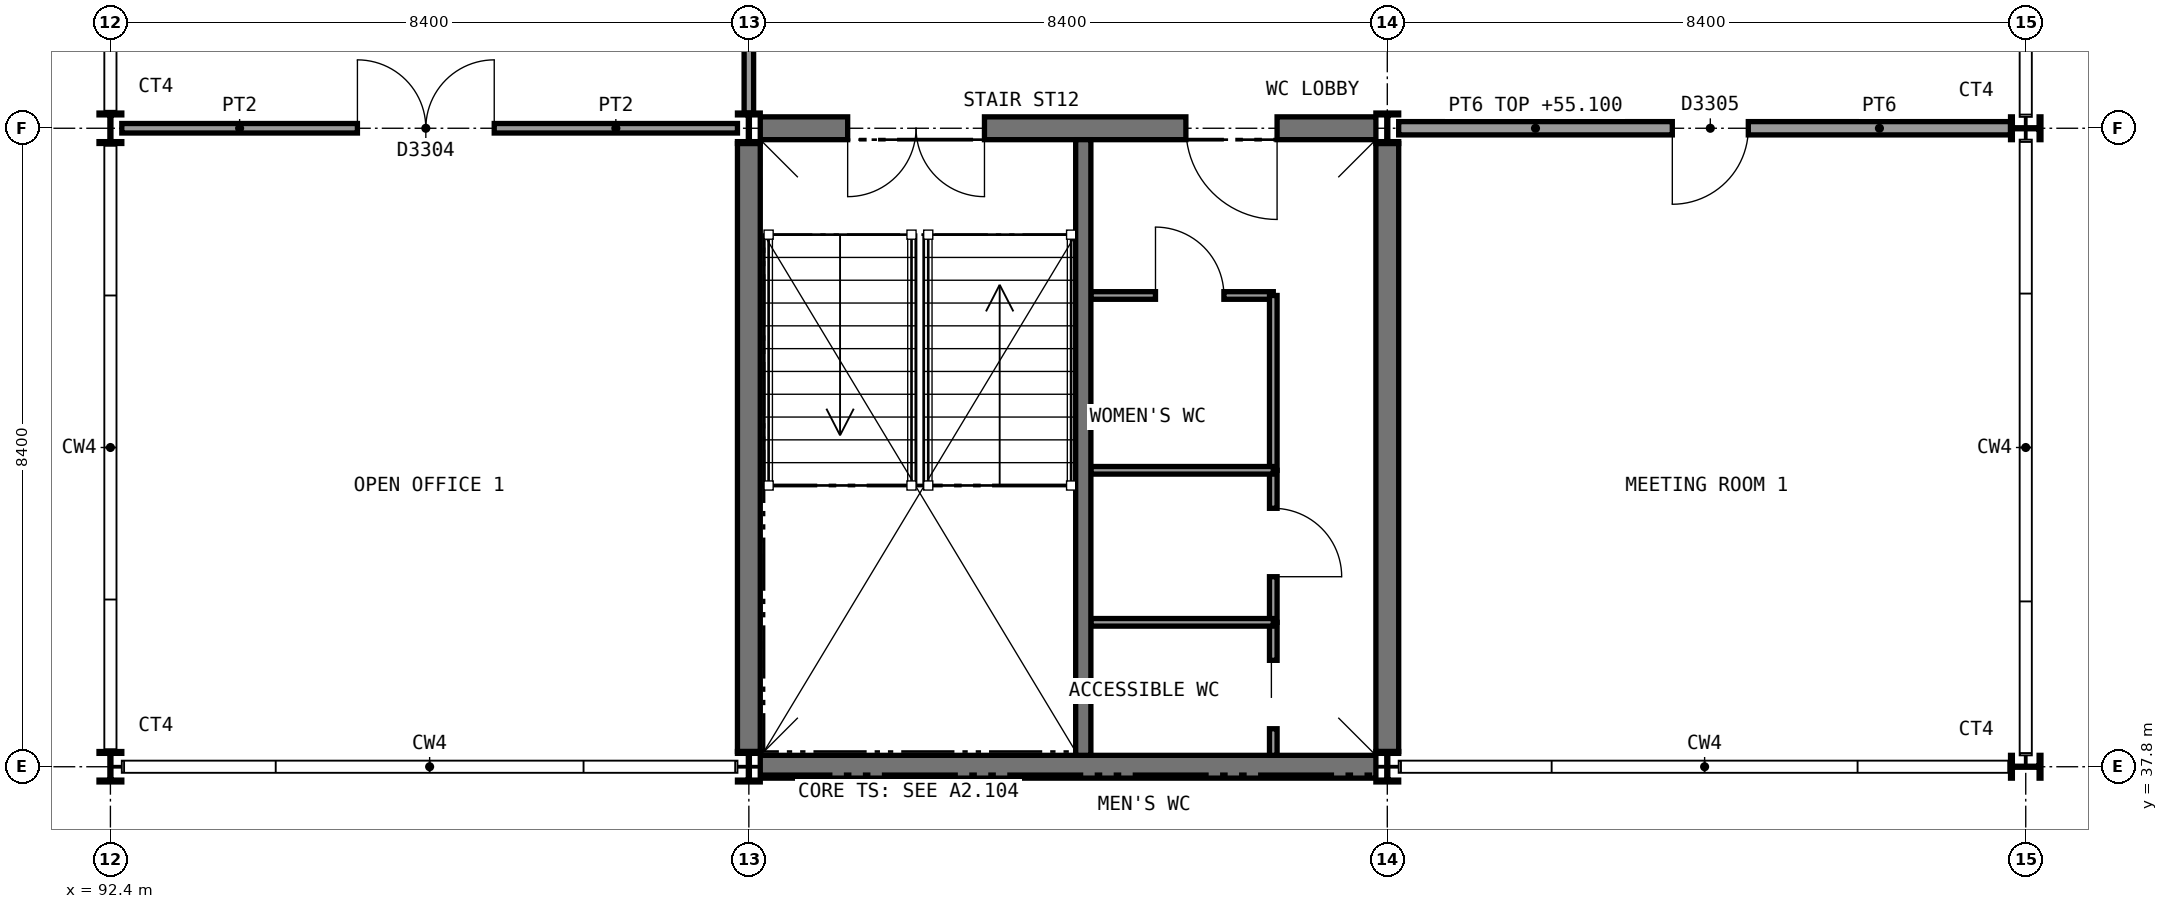
"""IFC4 building model, lengths in metres.
Left out: names, types, materials, properties, quantities, classifications, styles, units other than length and angle.
Written with IfcOpenShell. Run it as: python <this file> out.ifc"""

import sys

from ifc_helpers import new_model, si_unit, direction, frame, frame_2d, origin, origin_2d, place, context, subcontext, project, spatial, rectangle, i_section, extrude, element, fill, save


model = new_model("IFC4")
c1 = context("Model", 3, precision=1e-05, world=origin(), true_north=direction((0.0, 1.0)))
c2 = subcontext(c1, "Body", "Model", "MODEL_VIEW")
j1 = project(units=[si_unit("LENGTHUNIT", "METRE"), si_unit("PLANEANGLEUNIT", "RADIAN")], contexts=[c1])
p1 = place(None, origin())
s1 = spatial("IfcSite", under=j1, at=p1, CompositionType="ELEMENT")
p2 = place(p1, origin())
s2 = spatial("IfcBuilding", under=s1, at=p2, CompositionType="ELEMENT")
p3 = place(p2, frame((0.0, 0.0, 51.6)))
s3 = spatial("IfcBuildingStorey", under=s2, at=p3, CompositionType="ELEMENT", Elevation=51.6)
p4 = place(p3, frame((100.95, 37.8, 0.0), z_axis=(0.0, 0.0, 1.0), x_axis=(1.0, 0.0, 0.0)))
e1 = element("IfcWall", 1, at=p4, inside=s3, PredefinedType="SHEAR", context=c2, shape_type="SweptSolid", body=[
    extrude(rectangle(XDim=8.1, YDim=0.3, at=frame_2d((4.05, 0.0))), origin(), (0.0, 0.0, 1.0), 3.85),
])
p5 = place(p3, frame((100.95, 46.2, 0.0), z_axis=(0.0, 0.0, 1.0), x_axis=(1.0, 0.0, 0.0)))
e2 = element("IfcWall", 2, at=p5, inside=s3, PredefinedType="SHEAR", context=c2, shape_type="SweptSolid", body=[
    extrude(rectangle(XDim=8.1, YDim=0.3, at=frame_2d((4.05, 0.0))), origin(), (0.0, 0.0, 1.0), 3.85),
])
p6 = place(p5, frame((1.15, 0.0, 0.0)))
e3 = element("IfcOpeningElement", 3, at=p6, cuts=e2, PredefinedType="OPENING", context=c2, shape_type="SweptSolid", body=[
    extrude(rectangle(XDim=1.8, YDim=2.1, at=frame_2d((0.9, 1.05))), frame((0.0, 0.16, 0.0), z_axis=(0.0, -1.0, 0.0), x_axis=(1.0, 0.0, 0.0)), (0.0, 0.0, 1.0), 0.32),
])
p7 = place(p5, frame((5.6, 0.0, 0.0)))
e4 = element("IfcOpeningElement", 4, at=p7, cuts=e2, PredefinedType="OPENING", context=c2, shape_type="SweptSolid", body=[
    extrude(rectangle(XDim=1.2, YDim=2.1, at=frame_2d((0.6, 1.05))), frame((0.0, 0.16, 0.0), z_axis=(0.0, -1.0, 0.0), x_axis=(1.0, 0.0, 0.0)), (0.0, 0.0, 1.0), 0.32),
])
for number, where, z_axis, x_axis in (
    (5, (100.8, 38.0, 0.0), (0.0, 0.0, 1.0), (0.0, 1.0, 0.0)),
    (6, (109.2, 38.0, 0.0), (0.0, 0.0, 1.0), (0.0, 1.0, 0.0)),
):
    element("IfcWall", number, at=place(p3, frame(where, z_axis=z_axis, x_axis=x_axis)), inside=s3, PredefinedType="SHEAR", context=c2, shape_type="SweptSolid", body=[
        extrude(rectangle(XDim=8.0, YDim=0.3, at=frame_2d((4.0, 0.0))), origin(), (0.0, 0.0, 1.0), 3.85),
    ])
for number, where, z_axis, x_axis in (
    (7, (92.4, 37.8, 0.0), (0.0, 0.0, 1.0), (1.0, 0.0, 0.0)),
    (8, (92.4, 46.2, 0.0), (0.0, 0.0, 1.0), (1.0, 0.0, 0.0)),
    (9, (100.8, 37.8, 0.0), (0.0, 0.0, 1.0), (1.0, 0.0, 0.0)),
    (10, (100.8, 46.2, 0.0), (0.0, 0.0, 1.0), (1.0, 0.0, 0.0)),
    (11, (109.2, 37.8, 0.0), (0.0, 0.0, 1.0), (1.0, 0.0, 0.0)),
    (12, (109.2, 46.2, 0.0), (0.0, 0.0, 1.0), (1.0, 0.0, 0.0)),
    (13, (117.6, 37.8, 0.0), (0.0, 0.0, 1.0), (0.0, 1.0, 0.0)),
    (14, (117.6, 46.2, 0.0), (0.0, 0.0, 1.0), (0.0, 1.0, 0.0)),
):
    element("IfcColumn", number, at=place(p3, frame(where, z_axis=z_axis, x_axis=x_axis)), inside=s3, PredefinedType="COLUMN", context=c2, shape_type="SweptSolid", body=[
        extrude(i_section(OverallWidth=0.3, OverallDepth=0.4, WebThickness=0.013, FlangeThickness=0.024, FilletRadius=0.027, at=origin_2d()), origin(), (0.0, 0.0, 1.0), 4.0),
    ])
p8 = place(p3, frame((105.3, 44.0, 0.0), z_axis=(0.0, 0.0, 1.0), x_axis=(1.0, 0.0, 0.0)))
e15 = element("IfcWall", 15, at=p8, inside=s3, PredefinedType="PARTITIONING", context=c2, shape_type="SweptSolid", body=[
    extrude(rectangle(XDim=2.4, YDim=0.1, at=frame_2d((1.2, 0.0))), origin(), (0.0, 0.0, 1.0), 3.78),
])
p9 = place(p8, frame((0.85, 0.0, 0.0)))
e16 = element("IfcOpeningElement", 16, at=p9, cuts=e15, PredefinedType="OPENING", context=c2, shape_type="SweptSolid", body=[
    extrude(rectangle(XDim=0.9, YDim=2.1, at=frame_2d((0.45, 1.05))), frame((0.0, 0.06, 0.0), z_axis=(0.0, -1.0, 0.0), x_axis=(1.0, 0.0, 0.0)), (0.0, 0.0, 1.0), 0.12),
])
p10 = place(p3, frame((107.7, 41.7, 0.0), z_axis=(0.0, 0.0, 1.0), x_axis=(0.0, 1.0, 0.0)))
e17 = element("IfcWall", 17, at=p10, inside=s3, PredefinedType="PARTITIONING", context=c2, shape_type="SweptSolid", body=[
    extrude(rectangle(XDim=2.3, YDim=0.1, at=frame_2d((1.15, 0.0))), origin(), (0.0, 0.0, 1.0), 3.78),
])
p11 = place(p3, frame((107.7, 39.7, 0.0), z_axis=(0.0, 0.0, 1.0), x_axis=(0.0, 1.0, 0.0)))
e18 = element("IfcWall", 18, at=p11, inside=s3, PredefinedType="PARTITIONING", context=c2, shape_type="SweptSolid", body=[
    extrude(rectangle(XDim=2.0, YDim=0.1, at=frame_2d((1.0, 0.0))), origin(), (0.0, 0.0, 1.0), 3.78),
])
p12 = place(p11, frame((0.6, 0.0, 0.0)))
e19 = element("IfcOpeningElement", 19, at=p12, cuts=e18, PredefinedType="OPENING", context=c2, shape_type="SweptSolid", body=[
    extrude(rectangle(XDim=0.9, YDim=2.1, at=frame_2d((0.45, 1.05))), frame((0.0, 0.06, 0.0), z_axis=(0.0, -1.0, 0.0), x_axis=(1.0, 0.0, 0.0)), (0.0, 0.0, 1.0), 0.12),
])
p13 = place(p3, frame((107.7, 37.95, 0.0), z_axis=(0.0, 0.0, 1.0), x_axis=(0.0, 1.0, 0.0)))
e20 = element("IfcWall", 20, at=p13, inside=s3, PredefinedType="PARTITIONING", context=c2, shape_type="SweptSolid", body=[
    extrude(rectangle(XDim=1.75, YDim=0.1, at=frame_2d((0.875, 0.0))), origin(), (0.0, 0.0, 1.0), 3.78),
])
p14 = place(p13, frame((0.35, 0.0, 0.0)))
e21 = element("IfcOpeningElement", 21, at=p14, cuts=e20, PredefinedType="OPENING", context=c2, shape_type="SweptSolid", body=[
    extrude(rectangle(XDim=0.9, YDim=2.1, at=frame_2d((0.45, 1.05))), frame((0.0, 0.06, 0.0), z_axis=(0.0, -1.0, 0.0), x_axis=(1.0, 0.0, 0.0)), (0.0, 0.0, 1.0), 0.12),
])
for number, where, z_axis, x_axis in (
    (22, (105.3, 41.7, 0.0), (0.0, 0.0, 1.0), (1.0, 0.0, 0.0)),
    (23, (105.3, 39.7, 0.0), (0.0, 0.0, 1.0), (1.0, 0.0, 0.0)),
):
    element("IfcWall", number, at=place(p3, frame(where, z_axis=z_axis, x_axis=x_axis)), inside=s3, PredefinedType="PARTITIONING", context=c2, shape_type="SweptSolid", body=[
        extrude(rectangle(XDim=2.4, YDim=0.1, at=frame_2d((1.2, 0.0))), origin(), (0.0, 0.0, 1.0), 3.78),
    ])
p15 = place(p3, frame((92.55, 46.2, 0.0), z_axis=(0.0, 0.0, 1.0), x_axis=(1.0, 0.0, 0.0)))
e24 = element("IfcWall", 24, at=p15, inside=s3, PredefinedType="PARTITIONING", context=c2, shape_type="SweptSolid", body=[
    extrude(rectangle(XDim=8.1, YDim=0.125, at=frame_2d((4.05, 0.0))), origin(), (0.0, 0.0, 1.0), 3.5),
])
p16 = place(p15, frame((3.1, 0.0, 0.0)))
e25 = element("IfcOpeningElement", 25, at=p16, cuts=e24, PredefinedType="OPENING", context=c2, shape_type="SweptSolid", body=[
    extrude(rectangle(XDim=1.8, YDim=2.1, at=frame_2d((0.9, 1.05))), frame((0.0, 0.073, 0.0), z_axis=(0.0, -1.0, 0.0), x_axis=(1.0, 0.0, 0.0)), (0.0, 0.0, 1.0), 0.145),
])
p17 = place(p3, frame((109.35, 46.2, 0.0), z_axis=(0.0, 0.0, 1.0), x_axis=(1.0, 0.0, 0.0)))
e26 = element("IfcWall", 26, at=p17, inside=s3, PredefinedType="PARTITIONING", context=c2, shape_type="SweptSolid", body=[
    extrude(rectangle(XDim=8.05, YDim=0.175, at=frame_2d((4.025, 0.0))), origin(), (0.0, 0.0, 1.0), 3.5),
])
p18 = place(p17, frame((3.6, 0.0, 0.0)))
e27 = element("IfcOpeningElement", 27, at=p18, cuts=e26, PredefinedType="OPENING", context=c2, shape_type="SweptSolid", body=[
    extrude(rectangle(XDim=1.0, YDim=2.1, at=frame_2d((0.5, 1.05))), frame((0.0, 0.098, 0.0), z_axis=(0.0, -1.0, 0.0), x_axis=(1.0, 0.0, 0.0)), (0.0, 0.0, 1.0), 0.195),
])
p19 = place(p3, frame((100.8, 46.4, 0.0), z_axis=(0.0, 0.0, 1.0), x_axis=(0.0, 1.0, 0.0)))
e28 = element("IfcWall", 28, at=p19, inside=s3, PredefinedType="PARTITIONING", context=c2, shape_type="SweptSolid", body=[
    extrude(rectangle(XDim=3.1, YDim=0.125, at=frame_2d((1.55, 0.0))), origin(), (0.0, 0.0, 1.0), 3.5),
])
p20 = place(p3, frame((105.2, 37.95, 0.0), z_axis=(0.0, 0.0, 1.0), x_axis=(0.0, 1.0, 0.0)))
e29 = element("IfcWall", 29, at=p20, inside=s3, PredefinedType="SHEAR", context=c2, shape_type="SweptSolid", body=[
    extrude(rectangle(XDim=8.1, YDim=0.2, at=frame_2d((4.05, 0.0))), origin(), (0.0, 0.0, 1.0), 3.85),
])
p21 = place(p9, origin())
e30 = element("IfcDoor", 30, at=p21, inside=s3, OperationType="SINGLE_SWING_LEFT", PredefinedType="DOOR", context=c2, shape_type="SweptSolid", body=[
    extrude(rectangle(XDim=0.9, YDim=2.1, at=frame_2d((0.45, 1.05))), frame((0.0, 0.025, 0.0), z_axis=(0.0, -1.0, 0.0), x_axis=(1.0, 0.0, 0.0)), (0.0, 0.0, 1.0), 0.05),
])
fill(e16, e30)
p22 = place(p12, frame((0.9, 0.0, 0.0), z_axis=(0.0, 0.0, 1.0), x_axis=(-1.0, 0.0, 0.0)))
e31 = element("IfcDoor", 31, at=p22, inside=s3, OperationType="SINGLE_SWING_RIGHT", PredefinedType="DOOR", context=c2, shape_type="SweptSolid", body=[
    extrude(rectangle(XDim=0.9, YDim=2.1, at=frame_2d((0.45, 1.05))), frame((0.0, 0.025, 0.0), z_axis=(0.0, -1.0, 0.0), x_axis=(1.0, 0.0, 0.0)), (0.0, 0.0, 1.0), 0.05),
])
fill(e19, e31)
p23 = place(p14, origin())
e32 = element("IfcDoor", 32, at=p23, inside=s3, OperationType="SLIDING_TO_RIGHT", PredefinedType="DOOR", context=c2, shape_type="SweptSolid", body=[
    extrude(rectangle(XDim=0.9, YDim=2.1, at=frame_2d((0.45, 1.05))), frame((0.0, 0.025, 0.0), z_axis=(0.0, -1.0, 0.0), x_axis=(1.0, 0.0, 0.0)), (0.0, 0.0, 1.0), 0.05),
])
fill(e21, e32)
p24 = place(p16, origin())
e33 = element("IfcDoor", 33, at=p24, inside=s3, OperationType="DOUBLE_DOOR_SINGLE_SWING", PredefinedType="DOOR", context=c2, shape_type="SweptSolid", body=[
    extrude(rectangle(XDim=1.8, YDim=2.1, at=frame_2d((0.9, 1.05))), frame((0.0, 0.025, 0.0), z_axis=(0.0, -1.0, 0.0), x_axis=(1.0, 0.0, 0.0)), (0.0, 0.0, 1.0), 0.05),
])
fill(e25, e33)
p25 = place(p18, frame((1.0, 0.0, 0.0), z_axis=(0.0, 0.0, 1.0), x_axis=(-1.0, 0.0, 0.0)))
e34 = element("IfcDoor", 34, at=p25, inside=s3, OperationType="SINGLE_SWING_RIGHT", PredefinedType="DOOR", context=c2, shape_type="SweptSolid", body=[
    extrude(rectangle(XDim=1.0, YDim=2.1, at=frame_2d((0.5, 1.05))), frame((0.0, 0.025, 0.0), z_axis=(0.0, -1.0, 0.0), x_axis=(1.0, 0.0, 0.0)), (0.0, 0.0, 1.0), 0.05),
])
fill(e27, e34)
p26 = place(p6, frame((1.8, 0.0, 0.0), z_axis=(0.0, 0.0, 1.0), x_axis=(-1.0, 0.0, 0.0)))
e35 = element("IfcDoor", 35, at=p26, inside=s3, OperationType="DOUBLE_DOOR_SINGLE_SWING", PredefinedType="DOOR", context=c2, shape_type="SweptSolid", body=[
    extrude(rectangle(XDim=1.8, YDim=2.1, at=frame_2d((0.9, 1.05))), frame((0.0, 0.025, 0.0), z_axis=(0.0, -1.0, 0.0), x_axis=(1.0, 0.0, 0.0)), (0.0, 0.0, 1.0), 0.05),
])
fill(e3, e35)
p27 = place(p7, frame((1.2, 0.0, 0.0), z_axis=(0.0, 0.0, 1.0), x_axis=(-1.0, 0.0, 0.0)))
e36 = element("IfcDoor", 36, at=p27, inside=s3, OperationType="SINGLE_SWING_LEFT", PredefinedType="DOOR", context=c2, shape_type="SweptSolid", body=[
    extrude(rectangle(XDim=1.2, YDim=2.1, at=frame_2d((0.6, 1.05))), frame((0.0, 0.025, 0.0), z_axis=(0.0, -1.0, 0.0), x_axis=(1.0, 0.0, 0.0)), (0.0, 0.0, 1.0), 0.05),
])
fill(e4, e36)
save(model, sys.argv[1])
